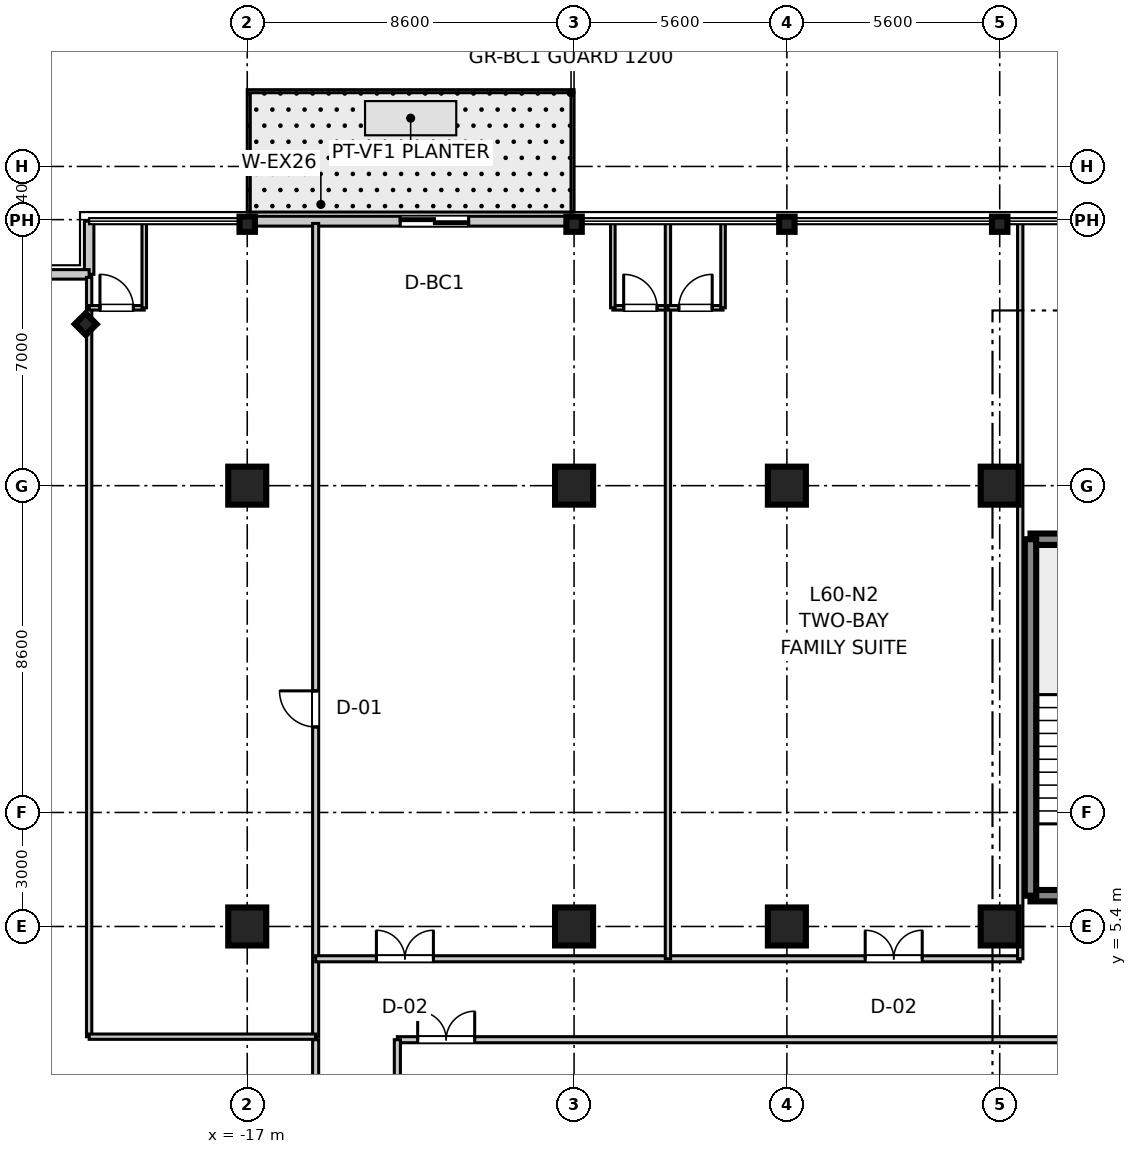
"""IFC4 building model, lengths in metres.
Left out: names, types, materials, properties, quantities, classifications, styles, units other than length and angle.
Written with IfcOpenShell. Run it as: python <this file> out.ifc"""

import sys

from ifc_helpers import new_model, si_unit, direction, frame, frame_2d, origin, origin_2d, place, context, subcontext, project, spatial, rectangle, i_section, extrude, source, transform, mapped, element, fill, save


model = new_model("IFC4")
c1 = context("Model", 3, precision=1e-05, world=origin(), true_north=direction((0.0, 1.0)))
c2 = subcontext(c1, "Body", "Model", "MODEL_VIEW")
j1 = project(units=[si_unit("LENGTHUNIT", "METRE"), si_unit("PLANEANGLEUNIT", "RADIAN")], contexts=[c1])
p1 = place(None, origin())
s1 = spatial("IfcSite", under=j1, at=p1, CompositionType="ELEMENT")
p2 = place(p1, origin())
s2 = spatial("IfcBuilding", under=s1, at=p2, CompositionType="ELEMENT")
p3 = place(p2, frame((0.0, 0.0, 234.5)))
s3 = spatial("IfcBuildingStorey", under=s2, at=p3, CompositionType="ELEMENT", Elevation=234.5)
m1 = source(origin(), c2, "Body", "SweptSolid", [
    extrude(rectangle(XDim=1.0, YDim=1.0, at=origin_2d()), origin(), (0.0, 0.0, 1.0), 3.655),
])
for number, where, z_axis, x_axis in (
    (1, (-17.0, 5.4, 0.0), (0.0, 0.0, 1.0), (1.0, 0.0, 0.0)),
    (2, (-17.0, 17.0, 0.0), (0.0, 0.0, 1.0), (1.0, 0.0, 0.0)),
    (3, (-8.4, 5.4, 0.0), (0.0, 0.0, 1.0), (1.0, 0.0, 0.0)),
    (4, (-8.4, 17.0, 0.0), (0.0, 0.0, 1.0), (1.0, 0.0, 0.0)),
    (5, (-2.8, 5.4, 0.0), (0.0, 0.0, 1.0), (1.0, 0.0, 0.0)),
    (6, (-2.8, 17.0, 0.0), (0.0, 0.0, 1.0), (1.0, 0.0, 0.0)),
    (7, (2.8, 5.4, 0.0), (0.0, 0.0, 1.0), (1.0, 0.0, 0.0)),
    (8, (2.8, 17.0, 0.0), (0.0, 0.0, 1.0), (1.0, 0.0, 0.0)),
):
    element("IfcColumn", number, at=place(p3, frame(where, z_axis=z_axis, x_axis=x_axis)), inside=s3, PredefinedType="COLUMN", context=c2, shape_type="MappedRepresentation", body=[
        mapped(m1, transform((0.0, 0.0, 0.0), scale=1.0)),
    ])
m2 = source(origin(), c2, "Body", "SweptSolid", [
    extrude(i_section(OverallWidth=0.401, OverallDepth=0.406, WebThickness=0.016, FlangeThickness=0.025, at=origin_2d()), origin(), (0.0, 0.0, 1.0), 3.655),
])
for number, where, z_axis, x_axis in (
    (9, (-17.0, 23.88, 0.0), (0.0, 0.0, 1.0), (0.0, 1.0, 0.0)),
    (10, (-8.4, 23.88, 0.0), (0.0, 0.0, 1.0), (0.0, 1.0, 0.0)),
    (11, (-2.8, 23.88, 0.0), (0.0, 0.0, 1.0), (0.0, 1.0, 0.0)),
    (12, (2.8, 23.88, 0.0), (0.0, 0.0, 1.0), (0.0, 1.0, 0.0)),
    (13, (-21.25, 21.25, 0.0), (0.0, 0.0, 1.0), (0.707, 0.707, 0.0)),
):
    element("IfcColumn", number, at=place(p3, frame(where, z_axis=z_axis, x_axis=x_axis)), inside=s3, PredefinedType="COLUMN", context=c2, shape_type="MappedRepresentation", body=[
        mapped(m2, transform((0.0, 0.0, 0.0), scale=1.0)),
    ])
m3 = source(origin(), c2, "Body", "SweptSolid", [
    extrude(rectangle(XDim=3.98, YDim=0.3, at=frame_2d((1.99, 0.0))), origin(), (0.0, 0.0, 1.0), 3.41),
])
for number, where, z_axis, x_axis in (
    (14, (3.61, 6.21, 0.0), (0.0, 0.0, 1.0), (1.0, 0.0, 0.0)),
    (15, (3.61, 15.59, 0.0), (0.0, 0.0, 1.0), (1.0, 0.0, 0.0)),
):
    element("IfcWall", number, at=place(p3, frame(where, z_axis=z_axis, x_axis=x_axis)), inside=s3, PredefinedType="SHEAR", context=c2, shape_type="MappedRepresentation", body=[
        mapped(m3, transform((0.0, 0.0, 0.0), scale=1.0)),
    ])
m4 = source(origin(), c2, "Body", "SweptSolid", [
    extrude(rectangle(XDim=9.38, YDim=0.3, at=frame_2d((4.69, 0.0))), origin(), (0.0, 0.0, 1.0), 3.41),
])
p4 = place(p3, frame((3.61, 6.21, 0.0), z_axis=(0.0, 0.0, 1.0), x_axis=(0.0, 1.0, 0.0)))
e16 = element("IfcWall", 16, at=p4, inside=s3, PredefinedType="SHEAR", context=c2, shape_type="MappedRepresentation", body=[
    mapped(m4, transform((0.0, 0.0, 0.0), scale=1.0)),
])
m5 = source(origin(), c2, "Body", "SweptSolid", [
    extrude(rectangle(XDim=1.4, YDim=0.25, at=frame_2d((0.7, 0.0))), origin(), (0.0, 0.0, 1.0), 3.41),
])
p5 = place(p3, frame((-21.16, 22.56, 0.0), z_axis=(0.0, 0.0, 1.0), x_axis=(0.0, 1.0, 0.0)))
e17 = element("IfcWall", 17, at=p5, inside=s3, PredefinedType="STANDARD", context=c2, shape_type="MappedRepresentation", body=[
    mapped(m5, transform((0.0, 0.0, 0.0), scale=1.0)),
])
m6 = source(origin(), c2, "Body", "SweptSolid", [
    extrude(rectangle(XDim=1.4, YDim=0.25, at=frame_2d((0.7, 0.0))), origin(), (0.0, 0.0, 1.0), 3.41),
])
p6 = place(p3, frame((-22.56, 22.56, 0.0), z_axis=(0.0, 0.0, 1.0), x_axis=(1.0, 0.0, 0.0)))
e18 = element("IfcWall", 18, at=p6, inside=s3, PredefinedType="STANDARD", context=c2, shape_type="MappedRepresentation", body=[
    mapped(m6, transform((0.0, 0.0, 0.0), scale=1.0)),
])
m7 = source(origin(), c2, "Body", "SweptSolid", [
    extrude(rectangle(XDim=8.6, YDim=0.26, at=frame_2d((4.3, 0.0))), origin(), (0.0, 0.0, 1.0), 2.89),
])
p7 = place(p3, frame((-17.0, 23.96, 0.0), z_axis=(0.0, 0.0, 1.0), x_axis=(1.0, 0.0, 0.0)))
e19 = element("IfcWall", 19, at=p7, inside=s3, PredefinedType="STANDARD", context=c2, shape_type="MappedRepresentation", body=[
    mapped(m7, transform((0.0, 0.0, 0.0), scale=1.0)),
])
p8 = place(p7, frame((4.025, 0.0, 0.0)))
e20 = element("IfcOpeningElement", 20, at=p8, cuts=e19, PredefinedType="OPENING", context=c2, shape_type="SweptSolid", body=[
    extrude(rectangle(XDim=1.8, YDim=2.25, at=frame_2d((0.9, 1.125))), frame((0.0, 0.14, 0.0), z_axis=(0.0, -1.0, 0.0), x_axis=(1.0, 0.0, 0.0)), (0.0, 0.0, 1.0), 0.28),
])
m8 = source(origin(), c2, "Body", "SweptSolid", [
    extrude(rectangle(XDim=21.4, YDim=0.16, at=frame_2d((10.7, 0.0))), origin(), (0.0, 0.0, 1.0), 2.75),
])
p9 = place(p3, frame((-15.2, 2.5, 0.0), z_axis=(0.0, 0.0, 1.0), x_axis=(0.0, 1.0, 0.0)))
e21 = element("IfcWall", 21, at=p9, inside=s3, PredefinedType="PARTITIONING", context=c2, shape_type="MappedRepresentation", body=[
    mapped(m8, transform((0.0, 0.0, 0.0), scale=1.0)),
])
p10 = place(p9, frame((8.15, 0.0, 0.0)))
e22 = element("IfcOpeningElement", 22, at=p10, cuts=e21, PredefinedType="OPENING", context=c2, shape_type="SweptSolid", body=[
    extrude(rectangle(XDim=0.95, YDim=2.1, at=frame_2d((0.475, 1.05))), frame((0.0, 0.09, 0.0), z_axis=(0.0, -1.0, 0.0), x_axis=(1.0, 0.0, 0.0)), (0.0, 0.0, 1.0), 0.18),
])
m9 = source(origin(), c2, "Body", "SweptSolid", [
    extrude(rectangle(XDim=19.98, YDim=0.14, at=frame_2d((9.99, 0.0))), origin(), (0.0, 0.0, 1.0), 2.75),
])
p11 = place(p3, frame((-21.16, 2.5, 0.0), z_axis=(0.0, 0.0, 1.0), x_axis=(0.0, 1.0, 0.0)))
e23 = element("IfcWall", 23, at=p11, inside=s3, PredefinedType="PARTITIONING", context=c2, shape_type="MappedRepresentation", body=[
    mapped(m9, transform((0.0, 0.0, 0.0), scale=1.0)),
])
m10 = source(origin(), c2, "Body", "SweptSolid", [
    extrude(rectangle(XDim=5.96, YDim=0.14, at=frame_2d((2.98, 0.0))), origin(), (0.0, 0.0, 1.0), 2.75),
])
p12 = place(p3, frame((-21.16, 2.5, 0.0), z_axis=(0.0, 0.0, 1.0), x_axis=(1.0, 0.0, 0.0)))
e24 = element("IfcWall", 24, at=p12, inside=s3, PredefinedType="PARTITIONING", context=c2, shape_type="MappedRepresentation", body=[
    mapped(m10, transform((0.0, 0.0, 0.0), scale=1.0)),
])
m11 = source(origin(), c2, "Body", "SweptSolid", [
    extrude(rectangle(XDim=1.45, YDim=0.12, at=frame_2d((0.725, 0.0))), origin(), (0.0, 0.0, 1.0), 2.75),
])
p13 = place(p3, frame((-21.16, 21.68, 0.0), z_axis=(0.0, 0.0, 1.0), x_axis=(1.0, 0.0, 0.0)))
e25 = element("IfcWall", 25, at=p13, inside=s3, PredefinedType="PARTITIONING", context=c2, shape_type="MappedRepresentation", body=[
    mapped(m11, transform((0.0, 0.0, 0.0), scale=1.0)),
])
p14 = place(p13, frame((0.285, 0.0, 0.0)))
e26 = element("IfcOpeningElement", 26, at=p14, cuts=e25, PredefinedType="OPENING", context=c2, shape_type="SweptSolid", body=[
    extrude(rectangle(XDim=0.88, YDim=2.1, at=frame_2d((0.44, 1.05))), frame((0.0, 0.07, 0.0), z_axis=(0.0, -1.0, 0.0), x_axis=(1.0, 0.0, 0.0)), (0.0, 0.0, 1.0), 0.14),
])
m12 = source(origin(), c2, "Body", "SweptSolid", [
    extrude(rectangle(XDim=2.22, YDim=0.12, at=frame_2d((1.11, 0.0))), origin(), (0.0, 0.0, 1.0), 2.75),
])
p15 = place(p3, frame((-19.71, 21.68, 0.0), z_axis=(0.0, 0.0, 1.0), x_axis=(0.0, 1.0, 0.0)))
e27 = element("IfcWall", 27, at=p15, inside=s3, PredefinedType="PARTITIONING", context=c2, shape_type="MappedRepresentation", body=[
    mapped(m12, transform((0.0, 0.0, 0.0), scale=1.0)),
])
m13 = source(origin(), c2, "Body", "SweptSolid", [
    extrude(rectangle(XDim=18.54, YDim=0.16, at=frame_2d((9.27, 0.0))), origin(), (0.0, 0.0, 1.0), 2.75),
])
p16 = place(p3, frame((-15.2, 4.55, 0.0), z_axis=(0.0, 0.0, 1.0), x_axis=(1.0, 0.0, 0.0)))
e28 = element("IfcWall", 28, at=p16, inside=s3, PredefinedType="PARTITIONING", context=c2, shape_type="MappedRepresentation", body=[
    mapped(m13, transform((0.0, 0.0, 0.0), scale=1.0)),
])
p17 = place(p16, frame((1.599, 0.0, 0.0)))
e29 = element("IfcOpeningElement", 29, at=p17, cuts=e28, PredefinedType="OPENING", context=c2, shape_type="SweptSolid", body=[
    extrude(rectangle(XDim=1.5, YDim=2.15, at=frame_2d((0.75, 1.075))), frame((0.0, 0.09, 0.0), z_axis=(0.0, -1.0, 0.0), x_axis=(1.0, 0.0, 0.0)), (0.0, 0.0, 1.0), 0.18),
])
p18 = place(p16, frame((14.461, 0.0, 0.0)))
e30 = element("IfcOpeningElement", 30, at=p18, cuts=e28, PredefinedType="OPENING", context=c2, shape_type="SweptSolid", body=[
    extrude(rectangle(XDim=1.5, YDim=2.15, at=frame_2d((0.75, 1.075))), frame((0.0, 0.09, 0.0), z_axis=(0.0, -1.0, 0.0), x_axis=(1.0, 0.0, 0.0)), (0.0, 0.0, 1.0), 0.18),
])
m14 = source(origin(), c2, "Body", "SweptSolid", [
    extrude(rectangle(XDim=19.35, YDim=0.14, at=frame_2d((9.675, 0.0))), origin(), (0.0, 0.0, 1.0), 2.75),
])
p19 = place(p3, frame((3.34, 4.55, 0.0), z_axis=(0.0, 0.0, 1.0), x_axis=(0.0, 1.0, 0.0)))
e31 = element("IfcWall", 31, at=p19, inside=s3, PredefinedType="PARTITIONING", context=c2, shape_type="MappedRepresentation", body=[
    mapped(m14, transform((0.0, 0.0, 0.0), scale=1.0)),
])
p20 = place(p3, frame((-7.38, 21.68, 0.0), z_axis=(0.0, 0.0, 1.0), x_axis=(1.0, 0.0, 0.0)))
e32 = element("IfcWall", 32, at=p20, inside=s3, PredefinedType="PARTITIONING", context=c2, shape_type="MappedRepresentation", body=[
    mapped(m11, transform((0.0, 0.0, 0.0), scale=1.0)),
])
p21 = place(p20, frame((0.285, 0.0, 0.0)))
e33 = element("IfcOpeningElement", 33, at=p21, cuts=e32, PredefinedType="OPENING", context=c2, shape_type="SweptSolid", body=[
    extrude(rectangle(XDim=0.88, YDim=2.1, at=frame_2d((0.44, 1.05))), frame((0.0, 0.07, 0.0), z_axis=(0.0, -1.0, 0.0), x_axis=(1.0, 0.0, 0.0)), (0.0, 0.0, 1.0), 0.14),
])
p22 = place(p3, frame((-7.38, 21.68, 0.0), z_axis=(0.0, 0.0, 1.0), x_axis=(0.0, 1.0, 0.0)))
e34 = element("IfcWall", 34, at=p22, inside=s3, PredefinedType="PARTITIONING", context=c2, shape_type="MappedRepresentation", body=[
    mapped(m12, transform((0.0, 0.0, 0.0), scale=1.0)),
])
p23 = place(p3, frame((-5.93, 4.55, 0.0), z_axis=(0.0, 0.0, 1.0), x_axis=(0.0, 1.0, 0.0)))
e35 = element("IfcWall", 35, at=p23, inside=s3, PredefinedType="PARTITIONING", context=c2, shape_type="MappedRepresentation", body=[
    mapped(m14, transform((0.0, 0.0, 0.0), scale=1.0)),
])
p24 = place(p3, frame((-5.93, 21.68, 0.0), z_axis=(0.0, 0.0, 1.0), x_axis=(1.0, 0.0, 0.0)))
e36 = element("IfcWall", 36, at=p24, inside=s3, PredefinedType="PARTITIONING", context=c2, shape_type="MappedRepresentation", body=[
    mapped(m11, transform((0.0, 0.0, 0.0), scale=1.0)),
])
p25 = place(p24, frame((0.285, 0.0, 0.0)))
e37 = element("IfcOpeningElement", 37, at=p25, cuts=e36, PredefinedType="OPENING", context=c2, shape_type="SweptSolid", body=[
    extrude(rectangle(XDim=0.88, YDim=2.1, at=frame_2d((0.44, 1.05))), frame((0.0, 0.07, 0.0), z_axis=(0.0, -1.0, 0.0), x_axis=(1.0, 0.0, 0.0)), (0.0, 0.0, 1.0), 0.14),
])
p26 = place(p3, frame((-4.48, 21.68, 0.0), z_axis=(0.0, 0.0, 1.0), x_axis=(0.0, 1.0, 0.0)))
e38 = element("IfcWall", 38, at=p26, inside=s3, PredefinedType="PARTITIONING", context=c2, shape_type="MappedRepresentation", body=[
    mapped(m12, transform((0.0, 0.0, 0.0), scale=1.0)),
])
m15 = source(origin(), c2, "Body", "SweptSolid", [
    extrude(rectangle(XDim=4.84, YDim=0.16, at=frame_2d((2.42, 0.0))), origin(), (0.0, 0.0, 1.0), 2.75),
])
p27 = place(p3, frame((-15.2, -2.42, 0.0), z_axis=(0.0, 0.0, 1.0), x_axis=(0.0, 1.0, 0.0)))
e39 = element("IfcWall", 39, at=p27, inside=s3, PredefinedType="PARTITIONING", context=c2, shape_type="MappedRepresentation", body=[
    mapped(m15, transform((0.0, 0.0, 0.0), scale=1.0)),
])
p28 = place(p27, frame((1.945, 0.0, 0.0)))
e40 = element("IfcOpeningElement", 40, at=p28, cuts=e39, PredefinedType="OPENING", context=c2, shape_type="SweptSolid", body=[
    extrude(rectangle(XDim=0.95, YDim=2.1, at=frame_2d((0.475, 1.05))), frame((0.0, 0.09, 0.0), z_axis=(0.0, -1.0, 0.0), x_axis=(1.0, 0.0, 0.0)), (0.0, 0.0, 1.0), 0.18),
])
m16 = source(origin(), c2, "Body", "SweptSolid", [
    extrude(rectangle(XDim=20.4, YDim=0.16, at=frame_2d((10.2, 0.0))), origin(), (0.0, 0.0, 1.0), 2.75),
])
p29 = place(p3, frame((-13.05, 2.42, 0.0), z_axis=(0.0, 0.0, 1.0), x_axis=(1.0, 0.0, 0.0)))
e41 = element("IfcWall", 41, at=p29, inside=s3, PredefinedType="PARTITIONING", context=c2, shape_type="MappedRepresentation", body=[
    mapped(m16, transform((0.0, 0.0, 0.0), scale=1.0)),
])
p30 = place(p29, frame((0.535, 0.0, 0.0)))
e42 = element("IfcOpeningElement", 42, at=p30, cuts=e41, PredefinedType="OPENING", context=c2, shape_type="SweptSolid", body=[
    extrude(rectangle(XDim=1.5, YDim=2.15, at=frame_2d((0.75, 1.075))), frame((0.0, 0.09, 0.0), z_axis=(0.0, -1.0, 0.0), x_axis=(1.0, 0.0, 0.0)), (0.0, 0.0, 1.0), 0.18),
])
p31 = place(p3, frame((-13.05, -2.42, 0.0), z_axis=(0.0, 0.0, 1.0), x_axis=(0.0, 1.0, 0.0)))
e43 = element("IfcWall", 43, at=p31, inside=s3, PredefinedType="PARTITIONING", context=c2, shape_type="MappedRepresentation", body=[
    mapped(m15, transform((0.0, 0.0, 0.0), scale=1.0)),
])
m17 = source(origin(), c2, "Body", "SweptSolid", [
    extrude(rectangle(XDim=0.88, YDim=2.1, at=frame_2d((0.44, 1.05))), frame((0.0, 0.025, 0.0), z_axis=(0.0, -1.0, 0.0), x_axis=(1.0, 0.0, 0.0)), (0.0, 0.0, 1.0), 0.05),
])
p32 = place(p14, origin())
e44 = element("IfcDoor", 44, at=p32, inside=s3, OperationType="SINGLE_SWING_LEFT", PredefinedType="DOOR", context=c2, shape_type="MappedRepresentation", body=[
    mapped(m17, transform((0.0, 0.0, 0.0), scale=1.0)),
])
fill(e26, e44)
m18 = source(origin(), c2, "Body", "SweptSolid", [
    extrude(rectangle(XDim=0.95, YDim=2.1, at=frame_2d((0.475, 1.05))), frame((0.0, 0.025, 0.0), z_axis=(0.0, -1.0, 0.0), x_axis=(1.0, 0.0, 0.0)), (0.0, 0.0, 1.0), 0.05),
])
p33 = place(p10, origin())
e45 = element("IfcDoor", 45, at=p33, inside=s3, OperationType="SINGLE_SWING_RIGHT", PredefinedType="DOOR", context=c2, shape_type="MappedRepresentation", body=[
    mapped(m18, transform((0.0, 0.0, 0.0), scale=1.0)),
])
fill(e22, e45)
p34 = place(p21, origin())
e46 = element("IfcDoor", 46, at=p34, inside=s3, OperationType="SINGLE_SWING_LEFT", PredefinedType="DOOR", context=c2, shape_type="MappedRepresentation", body=[
    mapped(m17, transform((0.0, 0.0, 0.0), scale=1.0)),
])
fill(e33, e46)
m19 = source(origin(), c2, "Body", "SweptSolid", [
    extrude(rectangle(XDim=1.5, YDim=2.15, at=frame_2d((0.75, 1.075))), frame((0.0, 0.025, 0.0), z_axis=(0.0, -1.0, 0.0), x_axis=(1.0, 0.0, 0.0)), (0.0, 0.0, 1.0), 0.05),
])
p35 = place(p17, origin())
e47 = element("IfcDoor", 47, at=p35, inside=s3, OperationType="DOUBLE_DOOR_SINGLE_SWING", PredefinedType="DOOR", context=c2, shape_type="MappedRepresentation", body=[
    mapped(m19, transform((0.0, 0.0, 0.0), scale=1.0)),
])
fill(e29, e47)
p36 = place(p25, origin())
e48 = element("IfcDoor", 48, at=p36, inside=s3, OperationType="SINGLE_SWING_RIGHT", PredefinedType="DOOR", context=c2, shape_type="MappedRepresentation", body=[
    mapped(m17, transform((0.0, 0.0, 0.0), scale=1.0)),
])
fill(e37, e48)
p37 = place(p18, origin())
e49 = element("IfcDoor", 49, at=p37, inside=s3, OperationType="DOUBLE_DOOR_SINGLE_SWING", PredefinedType="DOOR", context=c2, shape_type="MappedRepresentation", body=[
    mapped(m19, transform((0.0, 0.0, 0.0), scale=1.0)),
])
fill(e30, e49)
p38 = place(p30, frame((1.5, 0.0, 0.0), z_axis=(0.0, 0.0, 1.0), x_axis=(-1.0, 0.0, 0.0)))
e50 = element("IfcDoor", 50, at=p38, inside=s3, OperationType="DOUBLE_DOOR_SINGLE_SWING", PredefinedType="DOOR", context=c2, shape_type="MappedRepresentation", body=[
    mapped(m19, transform((0.0, 0.0, 0.0), scale=1.0)),
])
fill(e42, e50)
m20 = source(origin(), c2, "Body", "SweptSolid", [
    extrude(rectangle(XDim=1.8, YDim=2.25, at=frame_2d((0.9, 1.125))), frame((0.0, 0.025, 0.0), z_axis=(0.0, -1.0, 0.0), x_axis=(1.0, 0.0, 0.0)), (0.0, 0.0, 1.0), 0.05),
])
p39 = place(p8, origin())
e51 = element("IfcDoor", 51, at=p39, inside=s3, OperationType="DOUBLE_DOOR_SLIDING", PredefinedType="DOOR", context=c2, shape_type="MappedRepresentation", body=[
    mapped(m20, transform((0.0, 0.0, 0.0), scale=1.0)),
])
fill(e20, e51)
save(model, sys.argv[1])
